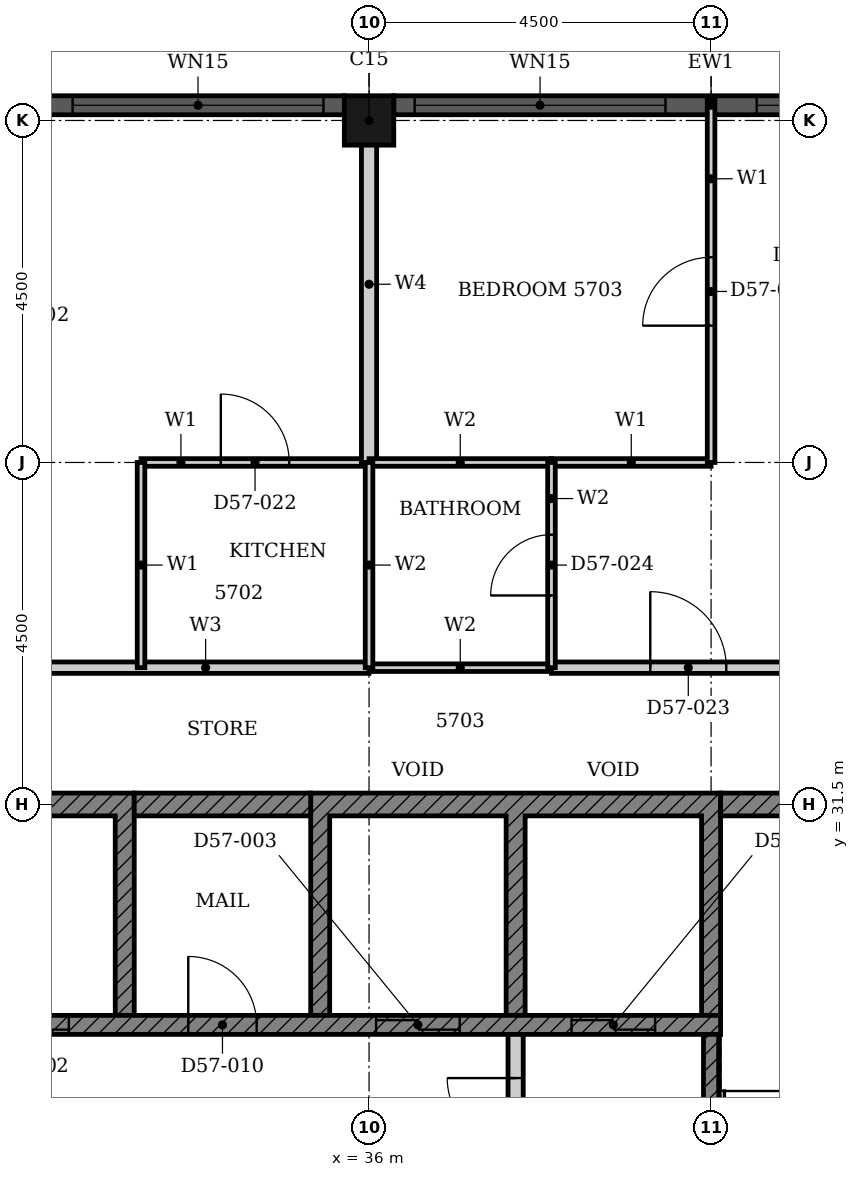
"""IFC4 building model, lengths in metres.
Left out: names, types, materials, properties, quantities, classifications, styles, units other than length and angle.
Written with IfcOpenShell. Run it as: python <this file> out.ifc"""

import sys

from ifc_helpers import new_model, si_unit, direction, frame, frame_2d, origin, origin_2d, place, context, subcontext, project, spatial, polyline, rectangle, hollow_rectangle, outline, extrude, element, fill, save


model = new_model("IFC4")
c1 = context("Model", 3, precision=1e-05, world=origin(), true_north=direction((0.0, 1.0)))
c2 = subcontext(c1, "Body", "Model", "MODEL_VIEW")
j1 = project(units=[si_unit("LENGTHUNIT", "METRE"), si_unit("PLANEANGLEUNIT", "RADIAN")], contexts=[c1])
p1 = place(None, origin())
s1 = spatial("IfcSite", under=j1, at=p1, CompositionType="ELEMENT")
p2 = place(p1, origin())
s2 = spatial("IfcBuilding", under=s1, at=p2, CompositionType="ELEMENT")
p3 = place(p2, frame((0.0, 0.0, 225.7)))
s3 = spatial("IfcBuildingStorey", under=s2, at=p3, CompositionType="ELEMENT", Elevation=225.7)
p4 = place(p3, frame((36.0, 40.5, 0.0), z_axis=(0.0, 0.0, 1.0), x_axis=(1.0, 0.0, 0.0)))
e1 = element("IfcColumn", 1, at=p4, inside=s3, PredefinedType="COLUMN", context=c2, shape_type="SweptSolid", body=[
    extrude(hollow_rectangle(XDim=0.65, YDim=0.65, WallThickness=0.021, at=origin_2d()), origin(), (0.0, 0.0, 1.0), 3.7),
])
p5 = place(p3, frame((44.675, 40.7, 0.0), z_axis=(0.0, 0.0, 1.0), x_axis=(-1.0, 0.0, 0.0)))
e2 = element("IfcWall", 2, at=p5, inside=s3, PredefinedType="SOLIDWALL", context=c2, shape_type="SweptSolid", body=[
    extrude(rectangle(XDim=8.35, YDim=0.25, at=frame_2d((4.175, 0.0))), origin(), (0.0, 0.0, 1.0), 3.7),
])
p6 = place(p5, frame((0.275, 0.0, 0.45)))
e3 = element("IfcOpeningElement", 3, at=p6, cuts=e2, PredefinedType="OPENING", context=c2, shape_type="SweptSolid", body=[
    extrude(rectangle(XDim=3.3, YDim=2.3, at=frame_2d((1.65, 1.15))), frame((0.0, 0.135, 0.0), z_axis=(0.0, -1.0, 0.0), x_axis=(1.0, 0.0, 0.0)), (0.0, 0.0, 1.0), 0.27),
])
p7 = place(p5, frame((4.775, 0.0, 0.45)))
e4 = element("IfcOpeningElement", 4, at=p7, cuts=e2, PredefinedType="OPENING", context=c2, shape_type="SweptSolid", body=[
    extrude(rectangle(XDim=3.3, YDim=2.3, at=frame_2d((1.65, 1.15))), frame((0.0, 0.135, 0.0), z_axis=(0.0, -1.0, 0.0), x_axis=(1.0, 0.0, 0.0)), (0.0, 0.0, 1.0), 0.27),
])
p8 = place(p3, frame((35.675, 40.7, 0.0), z_axis=(0.0, 0.0, 1.0), x_axis=(-1.0, 0.0, 0.0)))
e5 = element("IfcWall", 5, at=p8, inside=s3, PredefinedType="SOLIDWALL", context=c2, shape_type="SweptSolid", body=[
    extrude(rectangle(XDim=8.35, YDim=0.25, at=frame_2d((4.175, 0.0))), origin(), (0.0, 0.0, 1.0), 3.7),
])
p9 = place(p8, frame((0.275, 0.0, 0.45)))
e6 = element("IfcOpeningElement", 6, at=p9, cuts=e5, PredefinedType="OPENING", context=c2, shape_type="SweptSolid", body=[
    extrude(rectangle(XDim=3.3, YDim=2.3, at=frame_2d((1.65, 1.15))), frame((0.0, 0.135, 0.0), z_axis=(0.0, -1.0, 0.0), x_axis=(1.0, 0.0, 0.0)), (0.0, 0.0, 1.0), 0.27),
])
p10 = place(p8, frame((4.775, 0.0, 0.45)))
e7 = element("IfcOpeningElement", 7, at=p10, cuts=e5, PredefinedType="OPENING", context=c2, shape_type="SweptSolid", body=[
    extrude(rectangle(XDim=3.3, YDim=2.3, at=frame_2d((1.65, 1.15))), frame((0.0, 0.135, 0.0), z_axis=(0.0, -1.0, 0.0), x_axis=(1.0, 0.0, 0.0)), (0.0, 0.0, 1.0), 0.27),
])
p11 = place(p3, origin())
e8 = element("IfcWall", 8, at=p11, inside=s3, PredefinedType="SHEAR", context=c2, shape_type="SweptSolid", body=[
    extrude(outline(polyline([(27.518, 28.725), (27.768, 28.725), (27.768, 31.35), (30.089, 31.35), (30.089, 28.725), (30.339, 28.725), (30.339, 31.35), (32.661, 31.35), (32.661, 28.725), (32.911, 28.725), (32.911, 31.65), (27.518, 31.65), (27.518, 28.725)])), origin(), (0.0, 0.0, 1.0), 3.4),
])
p12 = place(p3, origin())
e9 = element("IfcWall", 9, at=p12, inside=s3, PredefinedType="SHEAR", context=c2, shape_type="SweptSolid", body=[
    extrude(outline(polyline([(35.232, 28.725), (35.482, 28.725), (35.482, 31.35), (37.803, 31.35), (37.803, 28.725), (38.053, 28.725), (38.053, 31.35), (40.375, 31.35), (40.375, 28.725), (40.625, 28.725), (40.625, 31.65), (35.232, 31.65), (35.232, 28.725)])), origin(), (0.0, 0.0, 1.0), 3.4),
])
p13 = place(p3, frame((32.911, 31.5, 0.0), z_axis=(0.0, 0.0, 1.0), x_axis=(1.0, 0.0, 0.0)))
e10 = element("IfcWall", 10, at=p13, inside=s3, PredefinedType="SHEAR", context=c2, shape_type="SweptSolid", body=[
    extrude(rectangle(XDim=2.322, YDim=0.3, at=frame_2d((1.161, 0.0))), origin(), (0.0, 0.0, 1.0), 3.4),
])
p14 = place(p3, frame((40.625, 31.5, 0.0), z_axis=(0.0, 0.0, 1.0), x_axis=(1.0, 0.0, 0.0)))
e11 = element("IfcWall", 11, at=p14, inside=s3, PredefinedType="SHEAR", context=c2, shape_type="SweptSolid", body=[
    extrude(rectangle(XDim=4.225, YDim=0.3, at=frame_2d((2.113, 0.0))), origin(), (0.0, 0.0, 1.0), 3.4),
])
p15 = place(p3, frame((24.947, 28.6, 0.0), z_axis=(0.0, 0.0, 1.0), x_axis=(1.0, 0.0, 0.0)))
e12 = element("IfcWall", 12, at=p15, inside=s3, PredefinedType="SHEAR", context=c2, shape_type="SweptSolid", body=[
    extrude(rectangle(XDim=15.678, YDim=0.25, at=frame_2d((7.839, 0.0))), origin(), (0.0, 0.0, 1.0), 3.4),
])
p16 = place(p15, frame((6.004, 0.0, 0.0)))
e13 = element("IfcOpeningElement", 13, at=p16, cuts=e12, PredefinedType="OPENING", context=c2, shape_type="SweptSolid", body=[
    extrude(rectangle(XDim=1.1, YDim=2.1, at=frame_2d((0.55, 1.05))), frame((0.0, 0.135, 0.0), z_axis=(0.0, -1.0, 0.0), x_axis=(1.0, 0.0, 0.0)), (0.0, 0.0, 1.0), 0.27),
])
p17 = place(p15, frame((11.146, 0.0, 0.0)))
e14 = element("IfcOpeningElement", 14, at=p17, cuts=e12, PredefinedType="OPENING", context=c2, shape_type="SweptSolid", body=[
    extrude(rectangle(XDim=1.1, YDim=2.1, at=frame_2d((0.55, 1.05))), frame((0.0, 0.135, 0.0), z_axis=(0.0, -1.0, 0.0), x_axis=(1.0, 0.0, 0.0)), (0.0, 0.0, 1.0), 0.27),
])
p18 = place(p15, frame((13.718, 0.0, 0.0)))
e15 = element("IfcOpeningElement", 15, at=p18, cuts=e12, PredefinedType="OPENING", context=c2, shape_type="SweptSolid", body=[
    extrude(rectangle(XDim=1.1, YDim=2.1, at=frame_2d((0.55, 1.05))), frame((0.0, 0.135, 0.0), z_axis=(0.0, -1.0, 0.0), x_axis=(1.0, 0.0, 0.0)), (0.0, 0.0, 1.0), 0.27),
])
p19 = place(p15, frame((0.961, 0.0, 0.0)))
e16 = element("IfcOpeningElement", 16, at=p19, cuts=e12, PredefinedType="OPENING", context=c2, shape_type="SweptSolid", body=[
    extrude(rectangle(XDim=0.9, YDim=2.1, at=frame_2d((0.45, 1.05))), frame((0.0, 0.135, 0.0), z_axis=(0.0, -1.0, 0.0), x_axis=(1.0, 0.0, 0.0)), (0.0, 0.0, 1.0), 0.27),
])
p20 = place(p15, frame((8.675, 0.0, 0.0)))
e17 = element("IfcOpeningElement", 17, at=p20, cuts=e12, PredefinedType="OPENING", context=c2, shape_type="SweptSolid", body=[
    extrude(rectangle(XDim=0.9, YDim=2.1, at=frame_2d((0.45, 1.05))), frame((0.0, 0.135, 0.0), z_axis=(0.0, -1.0, 0.0), x_axis=(1.0, 0.0, 0.0)), (0.0, 0.0, 1.0), 0.27),
])
p21 = place(p3, frame((40.5, 22.65, 0.0), z_axis=(0.0, 0.0, 1.0), x_axis=(0.0, 1.0, 0.0)))
e18 = element("IfcWall", 18, at=p21, inside=s3, PredefinedType="SHEAR", context=c2, shape_type="SweptSolid", body=[
    extrude(rectangle(XDim=5.825, YDim=0.2, at=frame_2d((2.913, 0.0))), origin(), (0.0, 0.0, 1.0), 3.4),
])
p22 = place(p21, frame((0.25, 0.0, 0.0)))
e19 = element("IfcOpeningElement", 19, at=p22, cuts=e18, PredefinedType="OPENING", context=c2, shape_type="SweptSolid", body=[
    extrude(rectangle(XDim=1.8, YDim=2.1, at=frame_2d((0.9, 1.05))), frame((0.0, 0.11, 0.0), z_axis=(0.0, -1.0, 0.0), x_axis=(1.0, 0.0, 0.0)), (0.0, 0.0, 1.0), 0.22),
])
p23 = place(p3, frame((37.928, 25.525, 0.0), z_axis=(0.0, 0.0, 1.0), x_axis=(0.0, 1.0, 0.0)))
e20 = element("IfcWall", 20, at=p23, inside=s3, PredefinedType="PARTITIONING", context=c2, shape_type="SweptSolid", body=[
    extrude(rectangle(XDim=2.95, YDim=0.2, at=frame_2d((1.475, 0.0))), origin(), (0.0, 0.0, 1.0), 3.4),
])
p24 = place(p23, frame((0.575, 0.0, 0.0)))
e21 = element("IfcOpeningElement", 21, at=p24, cuts=e20, PredefinedType="OPENING", context=c2, shape_type="SweptSolid", body=[
    extrude(rectangle(XDim=1.8, YDim=2.1, at=frame_2d((0.9, 1.05))), frame((0.0, 0.11, 0.0), z_axis=(0.0, -1.0, 0.0), x_axis=(1.0, 0.0, 0.0)), (0.0, 0.0, 1.0), 0.22),
])
p25 = place(p3, frame((29.4, 33.3, 0.0), z_axis=(0.0, 0.0, 1.0), x_axis=(1.0, 0.0, 0.0)))
e22 = element("IfcWall", 22, at=p25, inside=s3, PredefinedType="PARTITIONING", context=c2, shape_type="SweptSolid", body=[
    extrude(rectangle(XDim=6.6, YDim=0.15, at=frame_2d((3.3, 0.0))), origin(), (0.0, 0.0, 1.0), 3.4),
])
p26 = place(p25, frame((1.3, 0.0, 0.0)))
e23 = element("IfcOpeningElement", 23, at=p26, cuts=e22, PredefinedType="OPENING", context=c2, shape_type="SweptSolid", body=[
    extrude(rectangle(XDim=1.0, YDim=2.2, at=frame_2d((0.5, 1.1))), frame((0.0, 0.085, 0.0), z_axis=(0.0, -1.0, 0.0), x_axis=(1.0, 0.0, 0.0)), (0.0, 0.0, 1.0), 0.17),
])
p27 = place(p3, frame((38.4, 33.3, 0.0), z_axis=(0.0, 0.0, 1.0), x_axis=(1.0, 0.0, 0.0)))
e24 = element("IfcWall", 24, at=p27, inside=s3, PredefinedType="PARTITIONING", context=c2, shape_type="SweptSolid", body=[
    extrude(rectangle(XDim=6.6, YDim=0.15, at=frame_2d((3.3, 0.0))), origin(), (0.0, 0.0, 1.0), 3.4),
])
p28 = place(p27, frame((1.3, 0.0, 0.0)))
e25 = element("IfcOpeningElement", 25, at=p28, cuts=e24, PredefinedType="OPENING", context=c2, shape_type="SweptSolid", body=[
    extrude(rectangle(XDim=1.0, YDim=2.2, at=frame_2d((0.5, 1.1))), frame((0.0, 0.085, 0.0), z_axis=(0.0, -1.0, 0.0), x_axis=(1.0, 0.0, 0.0)), (0.0, 0.0, 1.0), 0.17),
])
p29 = place(p3, frame((33.0, 36.0, 0.0), z_axis=(0.0, 0.0, 1.0), x_axis=(1.0, 0.0, 0.0)))
e26 = element("IfcWall", 26, at=p29, inside=s3, PredefinedType="PARTITIONING", context=c2, shape_type="SweptSolid", body=[
    extrude(rectangle(XDim=3.0, YDim=0.1, at=frame_2d((1.5, 0.0))), origin(), (0.0, 0.0, 1.0), 3.4),
])
p30 = place(p29, frame((1.05, 0.0, 0.0)))
e27 = element("IfcOpeningElement", 27, at=p30, cuts=e26, PredefinedType="OPENING", context=c2, shape_type="SweptSolid", body=[
    extrude(rectangle(XDim=0.9, YDim=2.1, at=frame_2d((0.45, 1.05))), frame((0.0, 0.06, 0.0), z_axis=(0.0, -1.0, 0.0), x_axis=(1.0, 0.0, 0.0)), (0.0, 0.0, 1.0), 0.12),
])
p31 = place(p3, frame((38.4, 36.0, 0.0), z_axis=(0.0, 0.0, 1.0), x_axis=(1.0, 0.0, 0.0)))
e28 = element("IfcWall", 28, at=p31, inside=s3, PredefinedType="PARTITIONING", context=c2, shape_type="SweptSolid", body=[
    extrude(rectangle(XDim=2.1, YDim=0.1, at=frame_2d((1.05, 0.0))), origin(), (0.0, 0.0, 1.0), 3.4),
])
p32 = place(p3, frame((33.0, 33.3, 0.0), z_axis=(0.0, 0.0, 1.0), x_axis=(0.0, 1.0, 0.0)))
e29 = element("IfcWall", 29, at=p32, inside=s3, PredefinedType="PARTITIONING", context=c2, shape_type="SweptSolid", body=[
    extrude(rectangle(XDim=2.7, YDim=0.1, at=frame_2d((1.35, 0.0))), origin(), (0.0, 0.0, 1.0), 3.4),
])
p33 = place(p3, frame((40.5, 36.0, 0.0), z_axis=(0.0, 0.0, 1.0), x_axis=(0.0, 1.0, 0.0)))
e30 = element("IfcWall", 30, at=p33, inside=s3, PredefinedType="PARTITIONING", context=c2, shape_type="SweptSolid", body=[
    extrude(rectangle(XDim=4.765, YDim=0.1, at=frame_2d((2.382, 0.0))), origin(), (0.0, 0.0, 1.0), 3.4),
])
p34 = place(p33, frame((1.8, 0.0, 0.0)))
e31 = element("IfcOpeningElement", 31, at=p34, cuts=e30, PredefinedType="OPENING", context=c2, shape_type="SweptSolid", body=[
    extrude(rectangle(XDim=0.9, YDim=2.1, at=frame_2d((0.45, 1.05))), frame((0.0, 0.06, 0.0), z_axis=(0.0, -1.0, 0.0), x_axis=(1.0, 0.0, 0.0)), (0.0, 0.0, 1.0), 0.12),
])
p35 = place(p3, frame((36.0, 36.0, 0.0), z_axis=(0.0, 0.0, 1.0), x_axis=(0.0, 1.0, 0.0)))
e32 = element("IfcWall", 32, at=p35, inside=s3, PredefinedType="PARTITIONING", context=c2, shape_type="SweptSolid", body=[
    extrude(rectangle(XDim=4.69, YDim=0.2, at=frame_2d((2.345, 0.0))), origin(), (0.0, 0.0, 1.0), 3.4),
])
for number, where, z_axis, x_axis in (
    (33, (36.0, 33.3, 0.0), (0.0, 0.0, 1.0), (1.0, 0.0, 0.0)),
    (34, (36.0, 36.0, 0.0), (0.0, 0.0, 1.0), (1.0, 0.0, 0.0)),
):
    element("IfcWall", number, at=place(p3, frame(where, z_axis=z_axis, x_axis=x_axis)), inside=s3, PredefinedType="PARTITIONING", context=c2, shape_type="SweptSolid", body=[
        extrude(rectangle(XDim=2.4, YDim=0.1, at=frame_2d((1.2, 0.0))), origin(), (0.0, 0.0, 1.0), 3.4),
    ])
p36 = place(p3, frame((36.0, 33.3, 0.0), z_axis=(0.0, 0.0, 1.0), x_axis=(0.0, 1.0, 0.0)))
e35 = element("IfcWall", 35, at=p36, inside=s3, PredefinedType="PARTITIONING", context=c2, shape_type="SweptSolid", body=[
    extrude(rectangle(XDim=2.7, YDim=0.1, at=frame_2d((1.35, 0.0))), origin(), (0.0, 0.0, 1.0), 3.4),
])
p37 = place(p3, frame((38.4, 33.3, 0.0), z_axis=(0.0, 0.0, 1.0), x_axis=(0.0, 1.0, 0.0)))
e36 = element("IfcWall", 36, at=p37, inside=s3, PredefinedType="PARTITIONING", context=c2, shape_type="SweptSolid", body=[
    extrude(rectangle(XDim=2.7, YDim=0.1, at=frame_2d((1.35, 0.0))), origin(), (0.0, 0.0, 1.0), 3.4),
])
p38 = place(p37, frame((0.95, 0.0, 0.0)))
e37 = element("IfcOpeningElement", 37, at=p38, cuts=e36, PredefinedType="OPENING", context=c2, shape_type="SweptSolid", body=[
    extrude(rectangle(XDim=0.8, YDim=2.1, at=frame_2d((0.4, 1.05))), frame((0.0, 0.06, 0.0), z_axis=(0.0, -1.0, 0.0), x_axis=(1.0, 0.0, 0.0)), (0.0, 0.0, 1.0), 0.12),
])
p39 = place(p6, origin())
e38 = element("IfcWindow", 38, at=p39, inside=s3, PartitioningType="SINGLE_PANEL", PredefinedType="WINDOW", context=c2, shape_type="SweptSolid", body=[
    extrude(rectangle(XDim=3.3, YDim=2.3, at=frame_2d((1.65, 1.15))), frame((0.0, 0.03, 0.0), z_axis=(0.0, -1.0, 0.0), x_axis=(1.0, 0.0, 0.0)), (0.0, 0.0, 1.0), 0.06),
])
fill(e3, e38)
p40 = place(p7, origin())
e39 = element("IfcWindow", 39, at=p40, inside=s3, PartitioningType="SINGLE_PANEL", PredefinedType="WINDOW", context=c2, shape_type="SweptSolid", body=[
    extrude(rectangle(XDim=3.3, YDim=2.3, at=frame_2d((1.65, 1.15))), frame((0.0, 0.03, 0.0), z_axis=(0.0, -1.0, 0.0), x_axis=(1.0, 0.0, 0.0)), (0.0, 0.0, 1.0), 0.06),
])
fill(e4, e39)
p41 = place(p9, origin())
e40 = element("IfcWindow", 40, at=p41, inside=s3, PartitioningType="SINGLE_PANEL", PredefinedType="WINDOW", context=c2, shape_type="SweptSolid", body=[
    extrude(rectangle(XDim=3.3, YDim=2.3, at=frame_2d((1.65, 1.15))), frame((0.0, 0.03, 0.0), z_axis=(0.0, -1.0, 0.0), x_axis=(1.0, 0.0, 0.0)), (0.0, 0.0, 1.0), 0.06),
])
fill(e6, e40)
p42 = place(p16, origin())
e41 = element("IfcDoor", 41, at=p42, inside=s3, OperationType="DOUBLE_DOOR_SLIDING", PredefinedType="DOOR", context=c2, shape_type="SweptSolid", body=[
    extrude(rectangle(XDim=1.1, YDim=2.1, at=frame_2d((0.55, 1.05))), frame((0.0, 0.025, 0.0), z_axis=(0.0, -1.0, 0.0), x_axis=(1.0, 0.0, 0.0)), (0.0, 0.0, 1.0), 0.05),
])
fill(e13, e41)
p43 = place(p17, origin())
e42 = element("IfcDoor", 42, at=p43, inside=s3, OperationType="DOUBLE_DOOR_SLIDING", PredefinedType="DOOR", context=c2, shape_type="SweptSolid", body=[
    extrude(rectangle(XDim=1.1, YDim=2.1, at=frame_2d((0.55, 1.05))), frame((0.0, 0.025, 0.0), z_axis=(0.0, -1.0, 0.0), x_axis=(1.0, 0.0, 0.0)), (0.0, 0.0, 1.0), 0.05),
])
fill(e14, e42)
p44 = place(p18, origin())
e43 = element("IfcDoor", 43, at=p44, inside=s3, OperationType="DOUBLE_DOOR_SLIDING", PredefinedType="DOOR", context=c2, shape_type="SweptSolid", body=[
    extrude(rectangle(XDim=1.1, YDim=2.1, at=frame_2d((0.55, 1.05))), frame((0.0, 0.025, 0.0), z_axis=(0.0, -1.0, 0.0), x_axis=(1.0, 0.0, 0.0)), (0.0, 0.0, 1.0), 0.05),
])
fill(e15, e43)
p45 = place(p20, origin())
e44 = element("IfcDoor", 44, at=p45, inside=s3, OperationType="SINGLE_SWING_LEFT", PredefinedType="DOOR", context=c2, shape_type="SweptSolid", body=[
    extrude(rectangle(XDim=0.9, YDim=2.1, at=frame_2d((0.45, 1.05))), frame((0.0, 0.025, 0.0), z_axis=(0.0, -1.0, 0.0), x_axis=(1.0, 0.0, 0.0)), (0.0, 0.0, 1.0), 0.05),
])
fill(e17, e44)
p46 = place(p24, origin())
e45 = element("IfcDoor", 45, at=p46, inside=s3, OperationType="DOUBLE_DOOR_SINGLE_SWING", PredefinedType="DOOR", context=c2, shape_type="SweptSolid", body=[
    extrude(rectangle(XDim=1.8, YDim=2.1, at=frame_2d((0.9, 1.05))), frame((0.0, 0.025, 0.0), z_axis=(0.0, -1.0, 0.0), x_axis=(1.0, 0.0, 0.0)), (0.0, 0.0, 1.0), 0.05),
])
fill(e21, e45)
p47 = place(p30, origin())
e46 = element("IfcDoor", 46, at=p47, inside=s3, OperationType="SINGLE_SWING_RIGHT", PredefinedType="DOOR", context=c2, shape_type="SweptSolid", body=[
    extrude(rectangle(XDim=0.9, YDim=2.1, at=frame_2d((0.45, 1.05))), frame((0.0, 0.025, 0.0), z_axis=(0.0, -1.0, 0.0), x_axis=(1.0, 0.0, 0.0)), (0.0, 0.0, 1.0), 0.05),
])
fill(e27, e46)
p48 = place(p28, origin())
e47 = element("IfcDoor", 47, at=p48, inside=s3, OperationType="SINGLE_SWING_RIGHT", PredefinedType="DOOR", context=c2, shape_type="SweptSolid", body=[
    extrude(rectangle(XDim=1.0, YDim=2.2, at=frame_2d((0.5, 1.1))), frame((0.0, 0.025, 0.0), z_axis=(0.0, -1.0, 0.0), x_axis=(1.0, 0.0, 0.0)), (0.0, 0.0, 1.0), 0.05),
])
fill(e25, e47)
p49 = place(p38, origin())
e48 = element("IfcDoor", 48, at=p49, inside=s3, OperationType="SINGLE_SWING_LEFT", PredefinedType="DOOR", context=c2, shape_type="SweptSolid", body=[
    extrude(rectangle(XDim=0.8, YDim=2.1, at=frame_2d((0.4, 1.05))), frame((0.0, 0.025, 0.0), z_axis=(0.0, -1.0, 0.0), x_axis=(1.0, 0.0, 0.0)), (0.0, 0.0, 1.0), 0.05),
])
fill(e37, e48)
p50 = place(p34, origin())
e49 = element("IfcDoor", 49, at=p50, inside=s3, OperationType="SINGLE_SWING_RIGHT", PredefinedType="DOOR", context=c2, shape_type="SweptSolid", body=[
    extrude(rectangle(XDim=0.9, YDim=2.1, at=frame_2d((0.45, 1.05))), frame((0.0, 0.025, 0.0), z_axis=(0.0, -1.0, 0.0), x_axis=(1.0, 0.0, 0.0)), (0.0, 0.0, 1.0), 0.05),
])
fill(e31, e49)
save(model, sys.argv[1])
